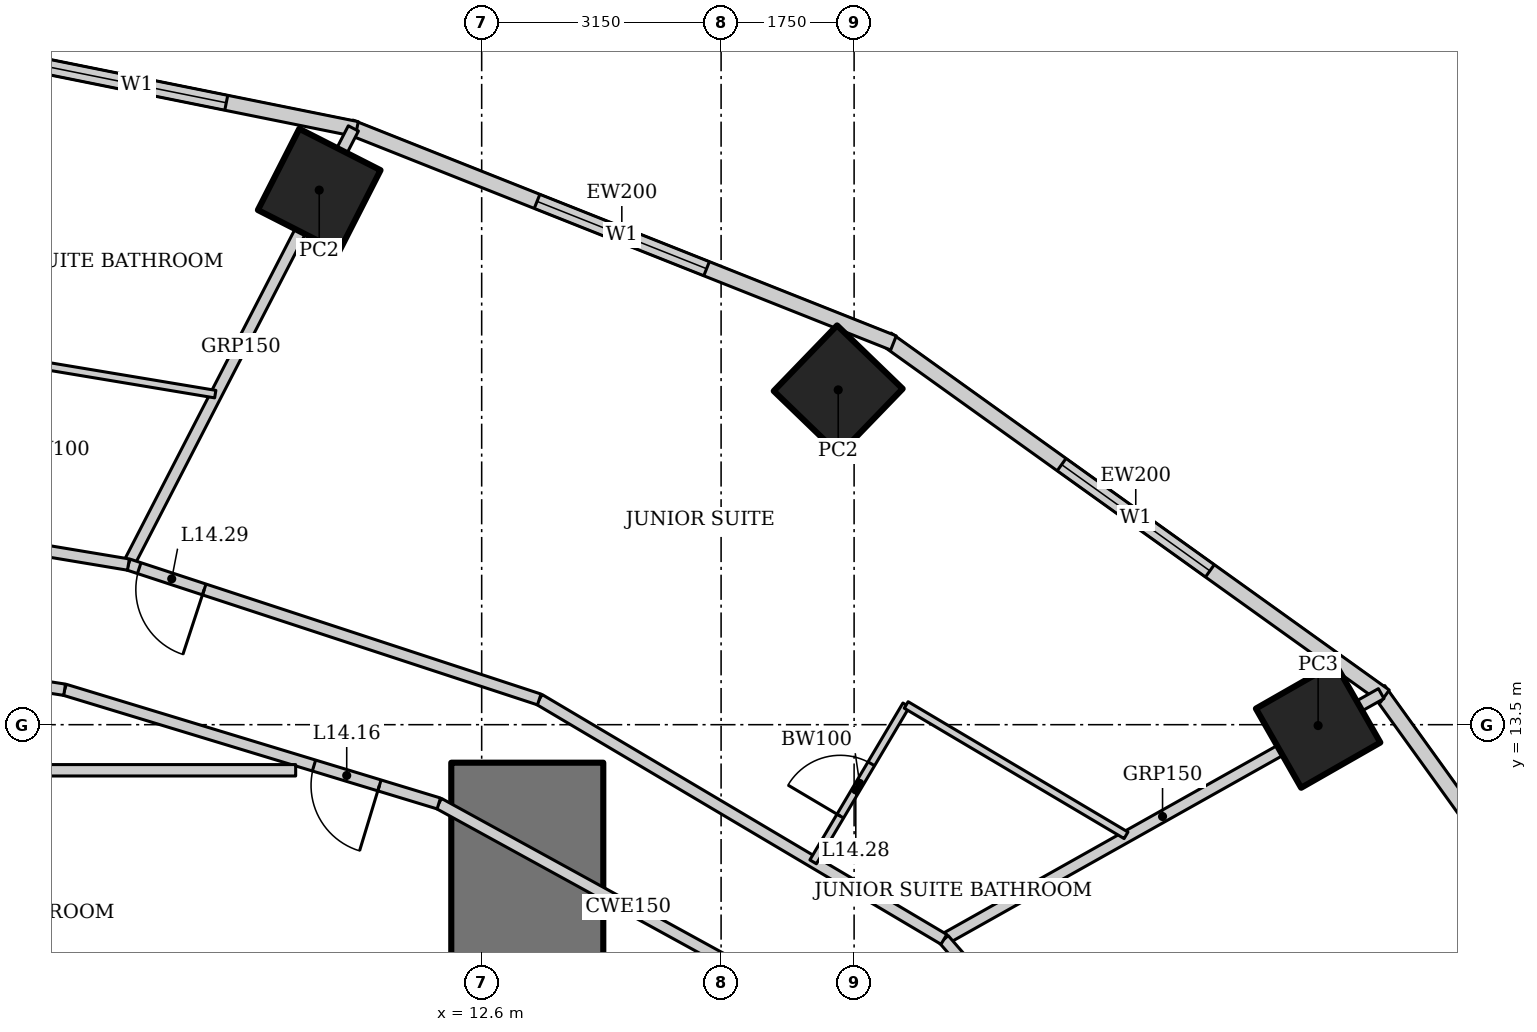
"""IFC4 building model, lengths in metres.
Left out: names, types, materials, properties, quantities, classifications, styles, units other than length and angle.
Written with IfcOpenShell. Run it as: python <this file> out.ifc"""

import sys

from ifc_helpers import new_model, si_unit, direction, frame, frame_2d, origin, origin_2d, place, context, subcontext, project, spatial, rectangle, hollow_rectangle, extrude, element, fill, save


model = new_model("IFC4")
c1 = context("Model", 3, precision=1e-05, world=origin(), true_north=direction((0.0, 1.0)))
c2 = subcontext(c1, "Body", "Model", "MODEL_VIEW")
j1 = project(units=[si_unit("LENGTHUNIT", "METRE"), si_unit("PLANEANGLEUNIT", "RADIAN")], contexts=[c1])
p1 = place(None, origin())
s1 = spatial("IfcSite", under=j1, at=p1, CompositionType="ELEMENT")
p2 = place(p1, origin())
s2 = spatial("IfcBuilding", under=s1, at=p2, CompositionType="ELEMENT")
p3 = place(p2, frame((0.0, 0.0, 65.8)))
s3 = spatial("IfcBuildingStorey", under=s2, at=p3, CompositionType="ELEMENT", Elevation=65.8)
p4 = place(p3, frame((23.605, 13.489, 0.0), z_axis=(0.0, 0.0, 1.0), x_axis=(0.86824298017, 0.496139221777, 0.0)))
e1 = element("IfcColumn", 1, at=p4, inside=s3, PredefinedType="COLUMN", context=c2, shape_type="SweptSolid", body=[
    extrude(hollow_rectangle(XDim=1.2, YDim=1.2, WallThickness=0.12, at=origin_2d()), origin(), (0.0, 0.0, 1.0), 3.6),
])
for number, where, z_axis, x_axis in (
    (2, (17.291, 17.905, 0.0), (0.0, 0.0, 1.0), (0.695, 0.719, 0.0)),
    (3, (10.463, 20.534, 0.0), (0.0, 0.0, 1.0), (0.454, 0.891, 0.0)),
):
    element("IfcColumn", number, at=place(p3, frame(where, z_axis=z_axis, x_axis=x_axis)), inside=s3, PredefinedType="COLUMN", context=c2, shape_type="SweptSolid", body=[
        extrude(hollow_rectangle(XDim=1.2, YDim=1.2, WallThickness=0.1, at=origin_2d()), origin(), (0.0, 0.0, 1.0), 3.6),
    ])
p5 = place(p3, frame((13.2, -13.0, 0.0), z_axis=(0.0, 0.0, 1.0), x_axis=(0.0, 1.0, 0.0)))
e4 = element("IfcWall", 4, at=p5, inside=s3, PredefinedType="SHEAR", context=c2, shape_type="SweptSolid", body=[
    extrude(rectangle(XDim=26.0, YDim=2.0, at=frame_2d((13.0, 0.0))), origin(), (0.0, 0.0, 1.0), 3.6),
])
p6 = place(p5, frame((12.1, 0.0, 0.0)))
e5 = element("IfcOpeningElement", 5, at=p6, cuts=e4, PredefinedType="OPENING", context=c2, shape_type="SweptSolid", body=[
    extrude(rectangle(XDim=1.8, YDim=2.1, at=frame_2d((0.9, 1.05))), frame((0.0, 1.01, 0.0), z_axis=(0.0, -1.0, 0.0), x_axis=(1.0, 0.0, 0.0)), (0.0, 0.0, 1.0), 2.02),
])
p7 = place(p3, frame((29.26, 7.2, 0.0), z_axis=(0.0, 0.0, 1.0), x_axis=(-0.583937613703, 0.811798536155, 0.0)))
e6 = element("IfcWall", 6, at=p7, inside=s3, PredefinedType="SOLIDWALL", context=c2, shape_type="SweptSolid", body=[
    extrude(rectangle(XDim=8.323, YDim=0.2, at=frame_2d((4.162, 0.0))), origin(), (0.0, 0.0, 1.0), 3.4),
])
p8 = place(p7, frame((2.961, 0.0, 0.5)))
e7 = element("IfcOpeningElement", 7, at=p8, cuts=e6, PredefinedType="OPENING", context=c2, shape_type="SweptSolid", body=[
    extrude(rectangle(XDim=2.4, YDim=2.2, at=frame_2d((1.2, 1.1))), frame((0.0, 0.11, 0.0), z_axis=(0.0, -1.0, 0.0), x_axis=(1.0, 0.0, 0.0)), (0.0, 0.0, 1.0), 0.22),
])
p9 = place(p3, frame((24.482, 13.875, 0.0), z_axis=(0.0, 0.0, 1.0), x_axis=(-0.812791321576, 0.582554948112, 0.0)))
e8 = element("IfcWall", 8, at=p9, inside=s3, PredefinedType="SOLIDWALL", context=c2, shape_type="SweptSolid", body=[
    extrude(rectangle(XDim=8.063, YDim=0.2, at=frame_2d((4.032, 0.0))), origin(), (0.0, 0.0, 1.0), 3.4),
])
p10 = place(p9, frame((2.832, 0.0, 0.5)))
e9 = element("IfcOpeningElement", 9, at=p10, cuts=e8, PredefinedType="OPENING", context=c2, shape_type="SweptSolid", body=[
    extrude(rectangle(XDim=2.4, YDim=2.2, at=frame_2d((1.2, 1.1))), frame((0.0, 0.11, 0.0), z_axis=(0.0, -1.0, 0.0), x_axis=(1.0, 0.0, 0.0)), (0.0, 0.0, 1.0), 0.22),
])
p11 = place(p3, frame((18.018, 18.523, 0.0), z_axis=(0.0, 0.0, 1.0), x_axis=(-0.929358351251, 0.369178892895, 0.0)))
e10 = element("IfcWall", 10, at=p11, inside=s3, PredefinedType="SOLIDWALL", context=c2, shape_type="SweptSolid", body=[
    extrude(rectangle(XDim=7.692, YDim=0.2, at=frame_2d((3.846, 0.0))), origin(), (0.0, 0.0, 1.0), 3.4),
])
p12 = place(p11, frame((2.646, 0.0, 0.5)))
e11 = element("IfcOpeningElement", 11, at=p12, cuts=e10, PredefinedType="OPENING", context=c2, shape_type="SweptSolid", body=[
    extrude(rectangle(XDim=2.4, YDim=2.2, at=frame_2d((1.2, 1.1))), frame((0.0, 0.11, 0.0), z_axis=(0.0, -1.0, 0.0), x_axis=(1.0, 0.0, 0.0)), (0.0, 0.0, 1.0), 0.22),
])
p13 = place(p3, frame((10.957, 21.337, 0.0), z_axis=(0.0, 0.0, 1.0), x_axis=(-0.980251657452, 0.197754110105, 0.0)))
e12 = element("IfcWall", 12, at=p13, inside=s3, PredefinedType="SOLIDWALL", context=c2, shape_type="SweptSolid", body=[
    extrude(rectangle(XDim=5.904, YDim=0.2, at=frame_2d((2.952, 0.0))), origin(), (0.0, 0.0, 1.0), 3.4),
])
p14 = place(p13, frame((1.752, 0.0, 0.5)))
e13 = element("IfcOpeningElement", 13, at=p14, cuts=e12, PredefinedType="OPENING", context=c2, shape_type="SweptSolid", body=[
    extrude(rectangle(XDim=2.4, YDim=2.2, at=frame_2d((1.2, 1.1))), frame((0.0, 0.11, 0.0), z_axis=(0.0, -1.0, 0.0), x_axis=(1.0, 0.0, 0.0)), (0.0, 0.0, 1.0), 0.22),
])
p15 = place(p3, frame((24.435, 13.909, 0.0), z_axis=(0.0, 0.0, 1.0), x_axis=(-0.871747379892, -0.489955616001, 0.0)))
e14 = element("IfcWall", 14, at=p15, inside=s3, PredefinedType="PARTITIONING", context=c2, shape_type="SweptSolid", body=[
    extrude(rectangle(XDim=6.6, YDim=0.15, at=frame_2d((3.3, 0.0))), origin(), (0.0, 0.0, 1.0), 2.693),
])
p16 = place(p3, frame((10.912, 21.346, 0.0), z_axis=(0.0, 0.0, 1.0), x_axis=(-0.458384799126, -0.888753833145, 0.0)))
e15 = element("IfcWall", 15, at=p16, inside=s3, PredefinedType="PARTITIONING", context=c2, shape_type="SweptSolid", body=[
    extrude(rectangle(XDim=6.457, YDim=0.15, at=frame_2d((3.229, 0.0))), origin(), (0.0, 0.0, 1.0), 2.528),
])
p17 = place(p3, frame((22.976, 5.729, 0.0), z_axis=(0.0, 0.0, 1.0), x_axis=(-0.655599989166, 0.755108372491, 0.0)))
e16 = element("IfcWall", 16, at=p17, inside=s3, PredefinedType="PARTITIONING", context=c2, shape_type="SweptSolid", body=[
    extrude(rectangle(XDim=6.551, YDim=0.15, at=frame_2d((3.275, 0.0))), origin(), (0.0, 0.0, 1.0), 3.45),
])
p18 = place(p17, frame((0.356, 0.0, 0.0)))
e17 = element("IfcOpeningElement", 17, at=p18, cuts=e16, PredefinedType="OPENING", context=c2, shape_type="SweptSolid", body=[
    extrude(rectangle(XDim=0.9, YDim=2.1, at=frame_2d((0.45, 1.05))), frame((0.0, 0.085, 0.0), z_axis=(0.0, -1.0, 0.0), x_axis=(1.0, 0.0, 0.0)), (0.0, 0.0, 1.0), 0.17),
])
p19 = place(p3, frame((18.681, 10.675, 0.0), z_axis=(0.0, 0.0, 1.0), x_axis=(-0.860147339762, 0.510045639036, 0.0)))
e18 = element("IfcWall", 18, at=p19, inside=s3, PredefinedType="PARTITIONING", context=c2, shape_type="SweptSolid", body=[
    extrude(rectangle(XDim=6.19, YDim=0.15, at=frame_2d((3.095, 0.0))), origin(), (0.0, 0.0, 1.0), 3.45),
])
p20 = place(p3, frame((13.357, 13.832, 0.0), z_axis=(0.0, 0.0, 1.0), x_axis=(-0.950106803111, 0.311924770869, 0.0)))
e19 = element("IfcWall", 19, at=p20, inside=s3, PredefinedType="PARTITIONING", context=c2, shape_type="SweptSolid", body=[
    extrude(rectangle(XDim=5.689, YDim=0.15, at=frame_2d((2.845, 0.0))), origin(), (0.0, 0.0, 1.0), 3.45),
])
p21 = place(p20, frame((4.639, 0.0, 0.0)))
e20 = element("IfcOpeningElement", 20, at=p21, cuts=e19, PredefinedType="OPENING", context=c2, shape_type="SweptSolid", body=[
    extrude(rectangle(XDim=0.9, YDim=2.1, at=frame_2d((0.45, 1.05))), frame((0.0, 0.085, 0.0), z_axis=(0.0, -1.0, 0.0), x_axis=(1.0, 0.0, 0.0)), (0.0, 0.0, 1.0), 0.17),
])
p22 = place(p3, frame((7.952, 15.607, 0.0), z_axis=(0.0, 0.0, 1.0), x_axis=(-0.98641101506, 0.164296407044, 0.0)))
e21 = element("IfcWall", 21, at=p22, inside=s3, PredefinedType="PARTITIONING", context=c2, shape_type="SweptSolid", body=[
    extrude(rectangle(XDim=4.245, YDim=0.15, at=frame_2d((2.123, 0.0))), origin(), (0.0, 0.0, 1.0), 3.45),
])
p23 = place(p3, frame((17.021, 9.726, 0.0), z_axis=(0.0, 0.0, 1.0), x_axis=(-0.876522084062, 0.481361647986, 0.0)))
e22 = element("IfcWall", 22, at=p23, inside=s3, PredefinedType="PARTITIONING", context=c2, shape_type="SweptSolid", body=[
    extrude(rectangle(XDim=5.687, YDim=0.15, at=frame_2d((2.844, 0.0))), origin(), (0.0, 0.0, 1.0), 3.45),
])
p24 = place(p3, frame((12.036, 12.464, 0.0), z_axis=(0.0, 0.0, 1.0), x_axis=(-0.956795045135, 0.290763205385, 0.0)))
e23 = element("IfcWall", 23, at=p24, inside=s3, PredefinedType="PARTITIONING", context=c2, shape_type="SweptSolid", body=[
    extrude(rectangle(XDim=5.146, YDim=0.15, at=frame_2d((2.573, 0.0))), origin(), (0.0, 0.0, 1.0), 3.45),
])
p25 = place(p24, frame((0.816, 0.0, 0.0)))
e24 = element("IfcOpeningElement", 24, at=p25, cuts=e23, PredefinedType="OPENING", context=c2, shape_type="SweptSolid", body=[
    extrude(rectangle(XDim=0.9, YDim=2.1, at=frame_2d((0.45, 1.05))), frame((0.0, 0.085, 0.0), z_axis=(0.0, -1.0, 0.0), x_axis=(1.0, 0.0, 0.0)), (0.0, 0.0, 1.0), 0.17),
])
p26 = place(p3, frame((7.113, 13.96, 0.0), z_axis=(0.0, 0.0, 1.0), x_axis=(-0.988343461108, 0.152240608529, 0.0)))
e25 = element("IfcWall", 25, at=p26, inside=s3, PredefinedType="PARTITIONING", context=c2, shape_type="SweptSolid", body=[
    extrude(rectangle(XDim=3.801, YDim=0.15, at=frame_2d((1.9, 0.0))), origin(), (0.0, 0.0, 1.0), 3.45),
])
p27 = place(p3, frame((10.153, 12.9, 0.0), z_axis=(0.0, 0.0, 1.0), x_axis=(-1.0, 0.0, 0.0)))
e26 = element("IfcWall", 26, at=p27, inside=s3, PredefinedType="PARTITIONING", context=c2, shape_type="SweptSolid", body=[
    extrude(rectangle(XDim=10.153, YDim=0.15, at=frame_2d((5.076, 0.0))), origin(), (0.0, 0.0, 1.0), 3.45),
])
p28 = place(p3, frame((16.961, 11.695, 0.0), z_axis=(0.0, 0.0, 1.0), x_axis=(0.510075642074, 0.860129548012, 0.0)))
e27 = element("IfcWall", 27, at=p28, inside=s3, PredefinedType="PARTITIONING", context=c2, shape_type="SweptSolid", body=[
    extrude(rectangle(XDim=2.4, YDim=0.1, at=frame_2d((1.2, 0.0))), origin(), (0.0, 0.0, 1.0), 3.45),
])
p29 = place(p28, frame((0.7, 0.0, 0.0)))
e28 = element("IfcOpeningElement", 28, at=p29, cuts=e27, PredefinedType="OPENING", context=c2, shape_type="SweptSolid", body=[
    extrude(rectangle(XDim=0.8, YDim=2.1, at=frame_2d((0.4, 1.05))), frame((0.0, 0.06, 0.0), z_axis=(0.0, -1.0, 0.0), x_axis=(1.0, 0.0, 0.0)), (0.0, 0.0, 1.0), 0.12),
])
p30 = place(p3, frame((18.185, 13.76, 0.0), z_axis=(0.0, 0.0, 1.0), x_axis=(0.860146437071, -0.510047161343, 0.0)))
e29 = element("IfcWall", 29, at=p30, inside=s3, PredefinedType="PARTITIONING", context=c2, shape_type="SweptSolid", body=[
    extrude(rectangle(XDim=3.363, YDim=0.1, at=frame_2d((1.681, 0.0))), origin(), (0.0, 0.0, 1.0), 3.45),
])
p31 = place(p3, frame((6.374, 18.303, 0.0), z_axis=(0.0, 0.0, 1.0), x_axis=(0.98640348956, -0.164341582641, 0.0)))
e30 = element("IfcWall", 30, at=p31, inside=s3, PredefinedType="PARTITIONING", context=c2, shape_type="SweptSolid", body=[
    extrude(rectangle(XDim=2.759, YDim=0.1, at=frame_2d((1.379, 0.0))), origin(), (0.0, 0.0, 1.0), 3.45),
])
p32 = place(p10, origin())
e31 = element("IfcWindow", 31, at=p32, inside=s3, PartitioningType="SINGLE_PANEL", PredefinedType="WINDOW", context=c2, shape_type="SweptSolid", body=[
    extrude(rectangle(XDim=2.4, YDim=2.2, at=frame_2d((1.2, 1.1))), frame((0.0, 0.03, 0.0), z_axis=(0.0, -1.0, 0.0), x_axis=(1.0, 0.0, 0.0)), (0.0, 0.0, 1.0), 0.06),
])
fill(e9, e31)
p33 = place(p12, origin())
e32 = element("IfcWindow", 32, at=p33, inside=s3, PartitioningType="SINGLE_PANEL", PredefinedType="WINDOW", context=c2, shape_type="SweptSolid", body=[
    extrude(rectangle(XDim=2.4, YDim=2.2, at=frame_2d((1.2, 1.1))), frame((0.0, 0.03, 0.0), z_axis=(0.0, -1.0, 0.0), x_axis=(1.0, 0.0, 0.0)), (0.0, 0.0, 1.0), 0.06),
])
fill(e11, e32)
p34 = place(p14, origin())
e33 = element("IfcWindow", 33, at=p34, inside=s3, PartitioningType="SINGLE_PANEL", PredefinedType="WINDOW", context=c2, shape_type="SweptSolid", body=[
    extrude(rectangle(XDim=2.4, YDim=2.2, at=frame_2d((1.2, 1.1))), frame((0.0, 0.03, 0.0), z_axis=(0.0, -1.0, 0.0), x_axis=(1.0, 0.0, 0.0)), (0.0, 0.0, 1.0), 0.06),
])
fill(e13, e33)
p35 = place(p25, origin())
e34 = element("IfcDoor", 34, at=p35, inside=s3, OperationType="SINGLE_SWING_LEFT", PredefinedType="DOOR", context=c2, shape_type="SweptSolid", body=[
    extrude(rectangle(XDim=0.9, YDim=2.1, at=frame_2d((0.45, 1.05))), frame((0.0, 0.025, 0.0), z_axis=(0.0, -1.0, 0.0), x_axis=(1.0, 0.0, 0.0)), (0.0, 0.0, 1.0), 0.05),
])
fill(e24, e34)
p36 = place(p29, origin())
e35 = element("IfcDoor", 35, at=p36, inside=s3, OperationType="SINGLE_SWING_LEFT", PredefinedType="DOOR", context=c2, shape_type="SweptSolid", body=[
    extrude(rectangle(XDim=0.8, YDim=2.1, at=frame_2d((0.4, 1.05))), frame((0.0, 0.025, 0.0), z_axis=(0.0, -1.0, 0.0), x_axis=(1.0, 0.0, 0.0)), (0.0, 0.0, 1.0), 0.05),
])
fill(e28, e35)
p37 = place(p21, origin())
e36 = element("IfcDoor", 36, at=p37, inside=s3, OperationType="SINGLE_SWING_LEFT", PredefinedType="DOOR", context=c2, shape_type="SweptSolid", body=[
    extrude(rectangle(XDim=0.9, YDim=2.1, at=frame_2d((0.45, 1.05))), frame((0.0, 0.025, 0.0), z_axis=(0.0, -1.0, 0.0), x_axis=(1.0, 0.0, 0.0)), (0.0, 0.0, 1.0), 0.05),
])
fill(e20, e36)
save(model, sys.argv[1])
